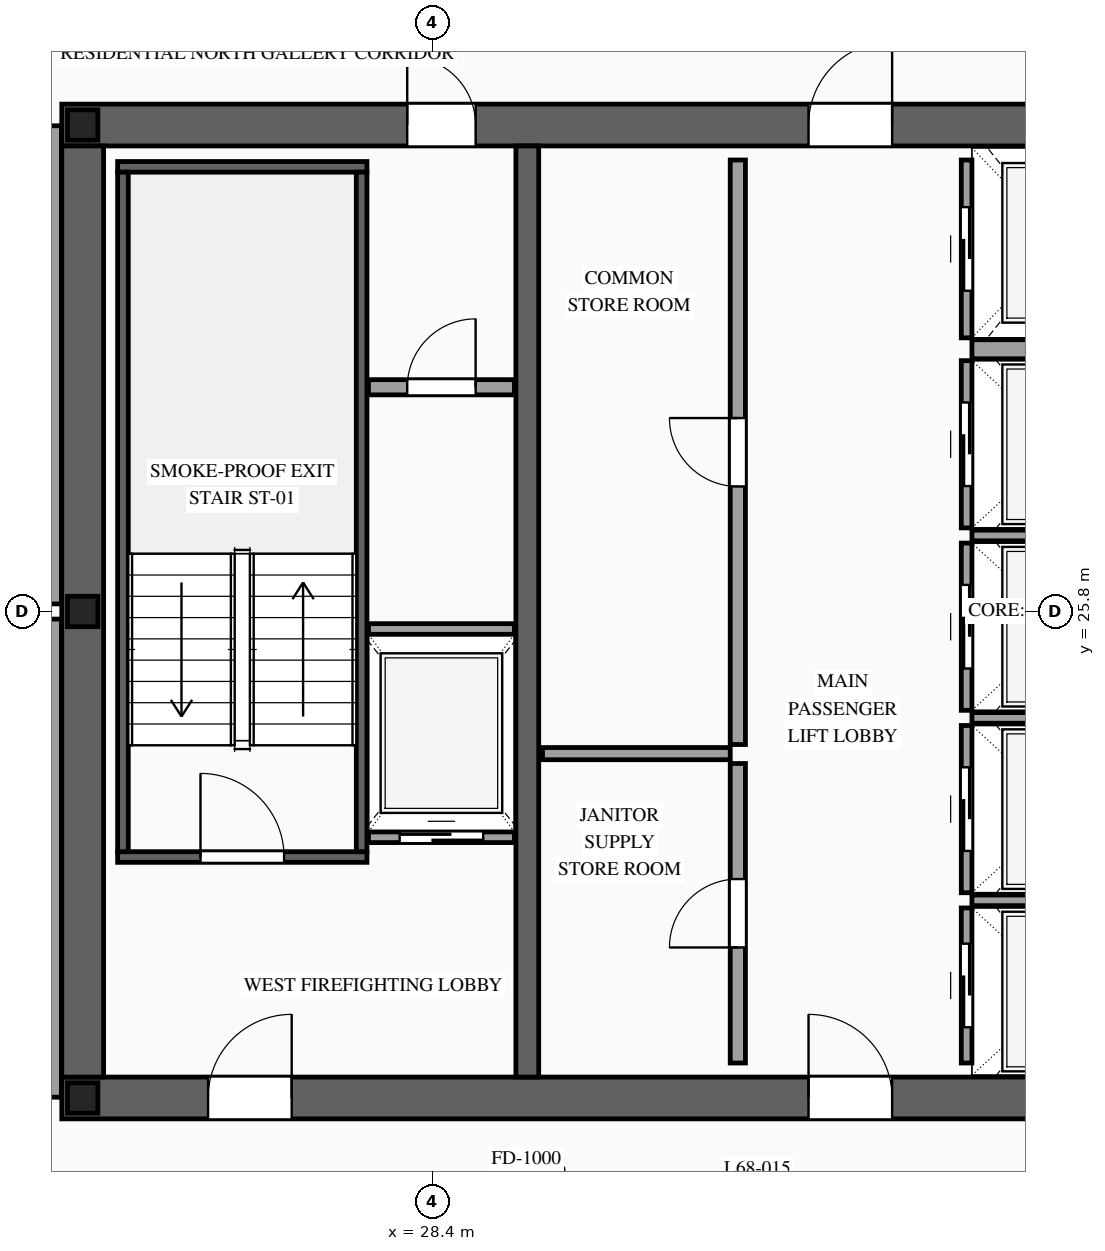
"""IFC4 building model, lengths in metres.
Left out: names, types, materials, properties, quantities, classifications, styles, units other than length and angle.
Written with IfcOpenShell. Run it as: python <this file> out.ifc"""

import sys

from ifc_helpers import new_model, si_unit, direction, frame, frame_2d, origin, origin_2d, place, context, subcontext, project, spatial, rectangle, i_section, extrude, source, transform, mapped, element, fill, save


model = new_model("IFC4")
c1 = context("Model", 3, precision=1e-05, world=origin(), true_north=direction((0.0, 1.0)))
c2 = subcontext(c1, "Body", "Model", "MODEL_VIEW")
j1 = project(units=[si_unit("LENGTHUNIT", "METRE"), si_unit("PLANEANGLEUNIT", "RADIAN")], contexts=[c1])
p1 = place(None, origin())
s1 = spatial("IfcSite", under=j1, at=p1, CompositionType="ELEMENT")
p2 = place(p1, origin())
s2 = spatial("IfcBuilding", under=s1, at=p2, CompositionType="ELEMENT")
p3 = place(p2, frame((0.0, 0.0, 255.6)))
s3 = spatial("IfcBuildingStorey", under=s2, at=p3, CompositionType="ELEMENT", Elevation=255.6)
p4 = place(p3, frame((23.525, 19.4, 0.0), z_axis=(0.0, 0.0, 1.0), x_axis=(1.0, 0.0, 0.0)))
e1 = element("IfcWall", 1, at=p4, inside=s3, PredefinedType="SHEAR", context=c2, shape_type="SweptSolid", body=[
    extrude(rectangle(XDim=26.95, YDim=0.55, at=frame_2d((13.475, 0.0))), origin(), (0.0, 0.0, 1.0), 3.5),
])
p5 = place(p4, frame((1.925, 0.0, 0.0)))
e2 = element("IfcOpeningElement", 2, at=p5, cuts=e1, PredefinedType="OPENING", context=c2, shape_type="SweptSolid", body=[
    extrude(rectangle(XDim=1.1, YDim=2.2, at=frame_2d((0.55, 1.1))), frame((0.0, 0.29, 0.0), z_axis=(0.0, -1.0, 0.0), x_axis=(1.0, 0.0, 0.0)), (0.0, 0.0, 1.0), 0.58),
])
p6 = place(p4, frame((9.825, 0.0, 0.0)))
e3 = element("IfcOpeningElement", 3, at=p6, cuts=e1, PredefinedType="OPENING", context=c2, shape_type="SweptSolid", body=[
    extrude(rectangle(XDim=1.1, YDim=2.2, at=frame_2d((0.55, 1.1))), frame((0.0, 0.29, 0.0), z_axis=(0.0, -1.0, 0.0), x_axis=(1.0, 0.0, 0.0)), (0.0, 0.0, 1.0), 0.58),
])
p7 = place(p4, frame((23.025, 0.0, 0.0)))
e4 = element("IfcOpeningElement", 4, at=p7, cuts=e1, PredefinedType="OPENING", context=c2, shape_type="SweptSolid", body=[
    extrude(rectangle(XDim=1.1, YDim=2.2, at=frame_2d((0.55, 1.1))), frame((0.0, 0.29, 0.0), z_axis=(0.0, -1.0, 0.0), x_axis=(1.0, 0.0, 0.0)), (0.0, 0.0, 1.0), 0.58),
])
p8 = place(p4, frame((19.645, 0.0, 0.0)))
e5 = element("IfcOpeningElement", 5, at=p8, cuts=e1, PredefinedType="OPENING", context=c2, shape_type="SweptSolid", body=[
    extrude(rectangle(XDim=0.9, YDim=2.15, at=frame_2d((0.45, 1.075))), frame((0.0, 0.29, 0.0), z_axis=(0.0, -1.0, 0.0), x_axis=(1.0, 0.0, 0.0)), (0.0, 0.0, 1.0), 0.58),
])
p9 = place(p4, frame((18.205, 0.0, 0.0)))
e6 = element("IfcOpeningElement", 6, at=p9, cuts=e1, PredefinedType="OPENING", context=c2, shape_type="SweptSolid", body=[
    extrude(rectangle(XDim=0.9, YDim=2.15, at=frame_2d((0.45, 1.075))), frame((0.0, 0.29, 0.0), z_axis=(0.0, -1.0, 0.0), x_axis=(1.0, 0.0, 0.0)), (0.0, 0.0, 1.0), 0.58),
])
p10 = place(p3, frame((23.525, 32.2, 0.0), z_axis=(0.0, 0.0, 1.0), x_axis=(1.0, 0.0, 0.0)))
e7 = element("IfcWall", 7, at=p10, inside=s3, PredefinedType="SHEAR", context=c2, shape_type="SweptSolid", body=[
    extrude(rectangle(XDim=26.95, YDim=0.55, at=frame_2d((13.475, 0.0))), origin(), (0.0, 0.0, 1.0), 3.5),
])
p11 = place(p10, frame((4.545, 0.0, 0.0)))
e8 = element("IfcOpeningElement", 8, at=p11, cuts=e7, PredefinedType="OPENING", context=c2, shape_type="SweptSolid", body=[
    extrude(rectangle(XDim=0.9, YDim=2.15, at=frame_2d((0.45, 1.075))), frame((0.0, 0.29, 0.0), z_axis=(0.0, -1.0, 0.0), x_axis=(1.0, 0.0, 0.0)), (0.0, 0.0, 1.0), 0.58),
])
p12 = place(p10, frame((9.825, 0.0, 0.0)))
e9 = element("IfcOpeningElement", 9, at=p12, cuts=e7, PredefinedType="OPENING", context=c2, shape_type="SweptSolid", body=[
    extrude(rectangle(XDim=1.1, YDim=2.2, at=frame_2d((0.55, 1.1))), frame((0.0, 0.29, 0.0), z_axis=(0.0, -1.0, 0.0), x_axis=(1.0, 0.0, 0.0)), (0.0, 0.0, 1.0), 0.58),
])
p13 = place(p10, frame((15.675, 0.0, 0.0)))
e10 = element("IfcOpeningElement", 10, at=p13, cuts=e7, PredefinedType="OPENING", context=c2, shape_type="SweptSolid", body=[
    extrude(rectangle(XDim=1.1, YDim=2.2, at=frame_2d((0.55, 1.1))), frame((0.0, 0.29, 0.0), z_axis=(0.0, -1.0, 0.0), x_axis=(1.0, 0.0, 0.0)), (0.0, 0.0, 1.0), 0.58),
])
p14 = place(p10, frame((18.875, 0.0, 0.0)))
e11 = element("IfcOpeningElement", 11, at=p14, cuts=e7, PredefinedType="OPENING", context=c2, shape_type="SweptSolid", body=[
    extrude(rectangle(XDim=0.9, YDim=2.15, at=frame_2d((0.45, 1.075))), frame((0.0, 0.29, 0.0), z_axis=(0.0, -1.0, 0.0), x_axis=(1.0, 0.0, 0.0)), (0.0, 0.0, 1.0), 0.58),
])
m1 = source(origin(), c2, "Body", "SweptSolid", [
    extrude(rectangle(XDim=12.25, YDim=0.55, at=frame_2d((6.125, 0.0))), origin(), (0.0, 0.0, 1.0), 3.5),
])
p15 = place(p3, frame((23.8, 19.675, 0.0), z_axis=(0.0, 0.0, 1.0), x_axis=(0.0, 1.0, 0.0)))
e12 = element("IfcWall", 12, at=p15, inside=s3, PredefinedType="SHEAR", context=c2, shape_type="MappedRepresentation", body=[
    mapped(m1, transform((0.0, 0.0, 0.0), scale=1.0)),
])
m2 = source(origin(), c2, "Body", "SweptSolid", [
    extrude(rectangle(XDim=12.25, YDim=0.3, at=frame_2d((6.125, 0.0))), origin(), (0.0, 0.0, 1.0), 3.5),
])
p16 = place(p3, frame((29.65, 19.675, 0.0), z_axis=(0.0, 0.0, 1.0), x_axis=(0.0, 1.0, 0.0)))
e13 = element("IfcWall", 13, at=p16, inside=s3, PredefinedType="SOLIDWALL", context=c2, shape_type="MappedRepresentation", body=[
    mapped(m2, transform((0.0, 0.0, 0.0), scale=1.0)),
])
m3 = source(origin(), c2, "Body", "SweptSolid", [
    extrude(i_section(OverallWidth=0.4, OverallDepth=0.4, WebThickness=0.013, FlangeThickness=0.021, at=origin_2d()), origin(), (0.0, 0.0, 1.0), 3.5),
])
for number, where, z_axis, x_axis in (
    (14, (23.8, 19.4, 0.0), (0.0, 0.0, 1.0), (1.0, 0.0, 0.0)),
    (15, (23.8, 25.8, 0.0), (0.0, 0.0, 1.0), (1.0, 0.0, 0.0)),
    (16, (23.8, 32.2, 0.0), (0.0, 0.0, 1.0), (1.0, 0.0, 0.0)),
):
    element("IfcColumn", number, at=place(p3, frame(where, z_axis=z_axis, x_axis=x_axis)), inside=s3, PredefinedType="COLUMN", context=c2, shape_type="MappedRepresentation", body=[
        mapped(m3, transform((0.0, 0.0, 0.0), scale=1.0)),
    ])
p17 = place(p3, frame((27.56, 22.83, 0.0), z_axis=(0.0, 0.0, 1.0), x_axis=(1.0, 0.0, 0.0)))
e17 = element("IfcWall", 17, at=p17, inside=s3, PredefinedType="SOLIDWALL", context=c2, shape_type="SweptSolid", body=[
    extrude(rectangle(XDim=1.92, YDim=0.14, at=frame_2d((0.96, 0.0))), origin(), (0.0, 0.0, 1.0), 3.2),
])
p18 = place(p17, frame((0.41, 0.0, 0.0)))
e18 = element("IfcOpeningElement", 18, at=p18, cuts=e17, PredefinedType="OPENING", context=c2, shape_type="SweptSolid", body=[
    extrude(rectangle(XDim=1.1, YDim=2.2, at=frame_2d((0.55, 1.1))), frame((0.0, 0.085, 0.0), z_axis=(0.0, -1.0, 0.0), x_axis=(1.0, 0.0, 0.0)), (0.0, 0.0, 1.0), 0.17),
])
m4 = source(origin(), c2, "Body", "SweptSolid", [
    extrude(rectangle(XDim=1.92, YDim=0.14, at=frame_2d((0.96, 0.0))), origin(), (0.0, 0.0, 1.0), 3.2),
])
p19 = place(p3, frame((27.56, 25.57, 0.0), z_axis=(0.0, 0.0, 1.0), x_axis=(1.0, 0.0, 0.0)))
e19 = element("IfcWall", 19, at=p19, inside=s3, PredefinedType="SOLIDWALL", context=c2, shape_type="MappedRepresentation", body=[
    mapped(m4, transform((0.0, 0.0, 0.0), scale=1.0)),
])
p20 = place(p3, frame((35.43, 19.86, 0.0), z_axis=(0.0, 0.0, 1.0), x_axis=(0.0, 1.0, 0.0)))
e20 = element("IfcWall", 20, at=p20, inside=s3, PredefinedType="SOLIDWALL", context=c2, shape_type="SweptSolid", body=[
    extrude(rectangle(XDim=2.04, YDim=0.14, at=frame_2d((1.02, 0.0))), origin(), (0.0, 0.0, 1.0), 3.2),
])
p21 = place(p20, frame((0.47, 0.0, 0.0)))
e21 = element("IfcOpeningElement", 21, at=p21, cuts=e20, PredefinedType="OPENING", context=c2, shape_type="SweptSolid", body=[
    extrude(rectangle(XDim=1.1, YDim=2.2, at=frame_2d((0.55, 1.1))), frame((0.0, 0.085, 0.0), z_axis=(0.0, -1.0, 0.0), x_axis=(1.0, 0.0, 0.0)), (0.0, 0.0, 1.0), 0.17),
])
m5 = source(origin(), c2, "Body", "SweptSolid", [
    extrude(rectangle(XDim=2.4, YDim=0.14, at=frame_2d((1.2, 0.0))), origin(), (0.0, 0.0, 1.0), 3.2),
])
p22 = place(p3, frame((35.5, 22.0, 0.0), z_axis=(0.0, 0.0, 1.0), x_axis=(1.0, 0.0, 0.0)))
e22 = element("IfcWall", 22, at=p22, inside=s3, PredefinedType="SOLIDWALL", context=c2, shape_type="MappedRepresentation", body=[
    mapped(m5, transform((0.0, 0.0, 0.0), scale=1.0)),
])
p23 = place(p3, frame((35.43, 22.1, 0.0), z_axis=(0.0, 0.0, 1.0), x_axis=(0.0, 1.0, 0.0)))
e23 = element("IfcWall", 23, at=p23, inside=s3, PredefinedType="SOLIDWALL", context=c2, shape_type="SweptSolid", body=[
    extrude(rectangle(XDim=2.2, YDim=0.14, at=frame_2d((1.1, 0.0))), origin(), (0.0, 0.0, 1.0), 3.2),
])
p24 = place(p23, frame((0.55, 0.0, 0.0)))
e24 = element("IfcOpeningElement", 24, at=p24, cuts=e23, PredefinedType="OPENING", context=c2, shape_type="SweptSolid", body=[
    extrude(rectangle(XDim=1.1, YDim=2.2, at=frame_2d((0.55, 1.1))), frame((0.0, 0.085, 0.0), z_axis=(0.0, -1.0, 0.0), x_axis=(1.0, 0.0, 0.0)), (0.0, 0.0, 1.0), 0.17),
])
p25 = place(p3, frame((35.5, 24.4, 0.0), z_axis=(0.0, 0.0, 1.0), x_axis=(1.0, 0.0, 0.0)))
e25 = element("IfcWall", 25, at=p25, inside=s3, PredefinedType="SOLIDWALL", context=c2, shape_type="MappedRepresentation", body=[
    mapped(m5, transform((0.0, 0.0, 0.0), scale=1.0)),
])
p26 = place(p3, frame((35.43, 24.5, 0.0), z_axis=(0.0, 0.0, 1.0), x_axis=(0.0, 1.0, 0.0)))
e26 = element("IfcWall", 26, at=p26, inside=s3, PredefinedType="SOLIDWALL", context=c2, shape_type="SweptSolid", body=[
    extrude(rectangle(XDim=2.2, YDim=0.14, at=frame_2d((1.1, 0.0))), origin(), (0.0, 0.0, 1.0), 3.2),
])
p27 = place(p26, frame((0.55, 0.0, 0.0)))
e27 = element("IfcOpeningElement", 27, at=p27, cuts=e26, PredefinedType="OPENING", context=c2, shape_type="SweptSolid", body=[
    extrude(rectangle(XDim=1.1, YDim=2.2, at=frame_2d((0.55, 1.1))), frame((0.0, 0.085, 0.0), z_axis=(0.0, -1.0, 0.0), x_axis=(1.0, 0.0, 0.0)), (0.0, 0.0, 1.0), 0.17),
])
p28 = place(p3, frame((35.5, 26.8, 0.0), z_axis=(0.0, 0.0, 1.0), x_axis=(1.0, 0.0, 0.0)))
e28 = element("IfcWall", 28, at=p28, inside=s3, PredefinedType="SOLIDWALL", context=c2, shape_type="MappedRepresentation", body=[
    mapped(m5, transform((0.0, 0.0, 0.0), scale=1.0)),
])
p29 = place(p3, frame((35.43, 26.9, 0.0), z_axis=(0.0, 0.0, 1.0), x_axis=(0.0, 1.0, 0.0)))
e29 = element("IfcWall", 29, at=p29, inside=s3, PredefinedType="SOLIDWALL", context=c2, shape_type="SweptSolid", body=[
    extrude(rectangle(XDim=2.2, YDim=0.14, at=frame_2d((1.1, 0.0))), origin(), (0.0, 0.0, 1.0), 3.2),
])
p30 = place(p29, frame((0.55, 0.0, 0.0)))
e30 = element("IfcOpeningElement", 30, at=p30, cuts=e29, PredefinedType="OPENING", context=c2, shape_type="SweptSolid", body=[
    extrude(rectangle(XDim=1.1, YDim=2.2, at=frame_2d((0.55, 1.1))), frame((0.0, 0.085, 0.0), z_axis=(0.0, -1.0, 0.0), x_axis=(1.0, 0.0, 0.0)), (0.0, 0.0, 1.0), 0.17),
])
p31 = place(p3, frame((35.43, 29.4, 0.0), z_axis=(0.0, 0.0, 1.0), x_axis=(0.0, 1.0, 0.0)))
e31 = element("IfcWall", 31, at=p31, inside=s3, PredefinedType="SOLIDWALL", context=c2, shape_type="SweptSolid", body=[
    extrude(rectangle(XDim=2.34, YDim=0.14, at=frame_2d((1.17, 0.0))), origin(), (0.0, 0.0, 1.0), 3.2),
])
p32 = place(p31, frame((0.62, 0.0, 0.0)))
e32 = element("IfcOpeningElement", 32, at=p32, cuts=e31, PredefinedType="OPENING", context=c2, shape_type="SweptSolid", body=[
    extrude(rectangle(XDim=1.1, YDim=2.2, at=frame_2d((0.55, 1.1))), frame((0.0, 0.085, 0.0), z_axis=(0.0, -1.0, 0.0), x_axis=(1.0, 0.0, 0.0)), (0.0, 0.0, 1.0), 0.17),
])
m6 = source(origin(), c2, "Body", "SweptSolid", [
    extrude(rectangle(XDim=2.4, YDim=0.25, at=frame_2d((1.2, 0.0))), origin(), (0.0, 0.0, 1.0), 3.2),
])
p33 = place(p3, frame((35.5, 29.25, 0.0), z_axis=(0.0, 0.0, 1.0), x_axis=(1.0, 0.0, 0.0)))
e33 = element("IfcWall", 33, at=p33, inside=s3, PredefinedType="SOLIDWALL", context=c2, shape_type="MappedRepresentation", body=[
    mapped(m6, transform((0.0, 0.0, 0.0), scale=1.0)),
])
p34 = place(p3, frame((24.26, 22.57, 0.0), z_axis=(0.0, 0.0, 1.0), x_axis=(1.0, 0.0, 0.0)))
e34 = element("IfcWall", 34, at=p34, inside=s3, PredefinedType="SOLIDWALL", context=c2, shape_type="SweptSolid", body=[
    extrude(rectangle(XDim=3.28, YDim=0.14, at=frame_2d((1.64, 0.0))), origin(), (0.0, 0.0, 1.0), 3.2),
])
p35 = place(p34, frame((1.09, 0.0, 0.0)))
e35 = element("IfcOpeningElement", 35, at=p35, cuts=e34, PredefinedType="OPENING", context=c2, shape_type="SweptSolid", body=[
    extrude(rectangle(XDim=1.1, YDim=2.2, at=frame_2d((0.55, 1.1))), frame((0.0, 0.085, 0.0), z_axis=(0.0, -1.0, 0.0), x_axis=(1.0, 0.0, 0.0)), (0.0, 0.0, 1.0), 0.17),
])
m7 = source(origin(), c2, "Body", "SweptSolid", [
    extrude(rectangle(XDim=3.28, YDim=0.14, at=frame_2d((1.64, 0.0))), origin(), (0.0, 0.0, 1.0), 3.2),
])
p36 = place(p3, frame((24.26, 31.65, 0.0), z_axis=(0.0, 0.0, 1.0), x_axis=(1.0, 0.0, 0.0)))
e36 = element("IfcWall", 36, at=p36, inside=s3, PredefinedType="SOLIDWALL", context=c2, shape_type="MappedRepresentation", body=[
    mapped(m7, transform((0.0, 0.0, 0.0), scale=1.0)),
])
m8 = source(origin(), c2, "Body", "SweptSolid", [
    extrude(rectangle(XDim=8.94, YDim=0.14, at=frame_2d((4.47, 0.0))), origin(), (0.0, 0.0, 1.0), 3.2),
])
for number, where, z_axis, x_axis in (
    (37, (24.33, 22.64, 0.0), (0.0, 0.0, 1.0), (0.0, 1.0, 0.0)),
    (38, (27.47, 22.64, 0.0), (0.0, 0.0, 1.0), (0.0, 1.0, 0.0)),
):
    element("IfcWall", number, at=place(p3, frame(where, z_axis=z_axis, x_axis=x_axis)), inside=s3, PredefinedType="SOLIDWALL", context=c2, shape_type="MappedRepresentation", body=[
        mapped(m8, transform((0.0, 0.0, 0.0), scale=1.0)),
    ])
p37 = place(p3, frame((27.56, 28.75, 0.0), z_axis=(0.0, 0.0, 1.0), x_axis=(1.0, 0.0, 0.0)))
e39 = element("IfcWall", 39, at=p37, inside=s3, PredefinedType="PARTITIONING", context=c2, shape_type="SweptSolid", body=[
    extrude(rectangle(XDim=1.92, YDim=0.2, at=frame_2d((0.96, 0.0))), origin(), (0.0, 0.0, 1.0), 3.2),
])
p38 = place(p37, frame((0.51, 0.0, 0.0)))
e40 = element("IfcOpeningElement", 40, at=p38, cuts=e39, PredefinedType="OPENING", context=c2, shape_type="SweptSolid", body=[
    extrude(rectangle(XDim=0.9, YDim=2.15, at=frame_2d((0.45, 1.075))), frame((0.0, 0.115, 0.0), z_axis=(0.0, -1.0, 0.0), x_axis=(1.0, 0.0, 0.0)), (0.0, 0.0, 1.0), 0.23),
])
p39 = place(p3, frame((32.42, 19.86, 0.0), z_axis=(0.0, 0.0, 1.0), x_axis=(0.0, 1.0, 0.0)))
e41 = element("IfcWall", 41, at=p39, inside=s3, PredefinedType="PARTITIONING", context=c2, shape_type="SweptSolid", body=[
    extrude(rectangle(XDim=3.94, YDim=0.2, at=frame_2d((1.97, 0.0))), origin(), (0.0, 0.0, 1.0), 3.2),
])
p40 = place(p39, frame((1.52, 0.0, 0.0)))
e42 = element("IfcOpeningElement", 42, at=p40, cuts=e41, PredefinedType="OPENING", context=c2, shape_type="SweptSolid", body=[
    extrude(rectangle(XDim=0.9, YDim=2.15, at=frame_2d((0.45, 1.075))), frame((0.0, 0.115, 0.0), z_axis=(0.0, -1.0, 0.0), x_axis=(1.0, 0.0, 0.0)), (0.0, 0.0, 1.0), 0.23),
])
p41 = place(p3, frame((32.42, 24.05, 0.0), z_axis=(0.0, 0.0, 1.0), x_axis=(0.0, 1.0, 0.0)))
e43 = element("IfcWall", 43, at=p41, inside=s3, PredefinedType="PARTITIONING", context=c2, shape_type="SweptSolid", body=[
    extrude(rectangle(XDim=7.69, YDim=0.2, at=frame_2d((3.845, 0.0))), origin(), (0.0, 0.0, 1.0), 3.2),
])
p42 = place(p41, frame((3.395, 0.0, 0.0)))
e44 = element("IfcOpeningElement", 44, at=p42, cuts=e43, PredefinedType="OPENING", context=c2, shape_type="SweptSolid", body=[
    extrude(rectangle(XDim=0.9, YDim=2.15, at=frame_2d((0.45, 1.075))), frame((0.0, 0.115, 0.0), z_axis=(0.0, -1.0, 0.0), x_axis=(1.0, 0.0, 0.0)), (0.0, 0.0, 1.0), 0.23),
])
m9 = source(origin(), c2, "Body", "SweptSolid", [
    extrude(rectangle(XDim=2.47, YDim=0.16, at=frame_2d((1.235, 0.0))), origin(), (0.0, 0.0, 1.0), 3.2),
])
p43 = place(p3, frame((29.85, 23.93, 0.0), z_axis=(0.0, 0.0, 1.0), x_axis=(1.0, 0.0, 0.0)))
e45 = element("IfcWall", 45, at=p43, inside=s3, PredefinedType="PARTITIONING", context=c2, shape_type="MappedRepresentation", body=[
    mapped(m9, transform((0.0, 0.0, 0.0), scale=1.0)),
])
m10 = source(origin(), c2, "Body", "SweptSolid", [
    extrude(rectangle(XDim=6.29, YDim=0.2, at=frame_2d((3.145, 0.0))), origin(), (0.0, 0.0, 1.0), 3.2),
])
for number, where, z_axis, x_axis in (
    (46, (23.42, 19.41, 0.0), (0.0, 0.0, 1.0), (0.0, 1.0, 0.0)),
    (47, (23.42, 25.9, 0.0), (0.0, 0.0, 1.0), (0.0, 1.0, 0.0)),
):
    element("IfcWall", number, at=place(p3, frame(where, z_axis=z_axis, x_axis=x_axis)), inside=s3, PredefinedType="PARTITIONING", context=c2, shape_type="MappedRepresentation", body=[
        mapped(m10, transform((0.0, 0.0, 0.0), scale=1.0)),
    ])
m11 = source(origin(), c2, "Body", "SweptSolid", [
    extrude(rectangle(XDim=1.1, YDim=2.2, at=frame_2d((0.55, 1.1))), frame((0.0, 0.025, 0.0), z_axis=(0.0, -1.0, 0.0), x_axis=(1.0, 0.0, 0.0)), (0.0, 0.0, 1.0), 0.05),
])
p44 = place(p18, origin())
e48 = element("IfcDoor", 48, at=p44, inside=s3, OperationType="SLIDING_TO_LEFT", PredefinedType="DOOR", context=c2, shape_type="MappedRepresentation", body=[
    mapped(m11, transform((0.0, 0.0, 0.0), scale=1.0)),
])
fill(e18, e48)
p45 = place(p21, origin())
e49 = element("IfcDoor", 49, at=p45, inside=s3, OperationType="SLIDING_TO_RIGHT", PredefinedType="DOOR", context=c2, shape_type="MappedRepresentation", body=[
    mapped(m11, transform((0.0, 0.0, 0.0), scale=1.0)),
])
fill(e21, e49)
p46 = place(p24, origin())
e50 = element("IfcDoor", 50, at=p46, inside=s3, OperationType="SLIDING_TO_LEFT", PredefinedType="DOOR", context=c2, shape_type="MappedRepresentation", body=[
    mapped(m11, transform((0.0, 0.0, 0.0), scale=1.0)),
])
fill(e24, e50)
p47 = place(p27, origin())
e51 = element("IfcDoor", 51, at=p47, inside=s3, OperationType="SLIDING_TO_RIGHT", PredefinedType="DOOR", context=c2, shape_type="MappedRepresentation", body=[
    mapped(m11, transform((0.0, 0.0, 0.0), scale=1.0)),
])
fill(e27, e51)
p48 = place(p30, origin())
e52 = element("IfcDoor", 52, at=p48, inside=s3, OperationType="SLIDING_TO_LEFT", PredefinedType="DOOR", context=c2, shape_type="MappedRepresentation", body=[
    mapped(m11, transform((0.0, 0.0, 0.0), scale=1.0)),
])
fill(e30, e52)
p49 = place(p32, origin())
e53 = element("IfcDoor", 53, at=p49, inside=s3, OperationType="SLIDING_TO_RIGHT", PredefinedType="DOOR", context=c2, shape_type="MappedRepresentation", body=[
    mapped(m11, transform((0.0, 0.0, 0.0), scale=1.0)),
])
fill(e32, e53)
m12 = source(origin(), c2, "Body", "SweptSolid", [
    extrude(rectangle(XDim=1.1, YDim=2.2, at=frame_2d((0.55, 1.1))), frame((0.0, 0.025, 0.0), z_axis=(0.0, -1.0, 0.0), x_axis=(1.0, 0.0, 0.0)), (0.0, 0.0, 1.0), 0.05),
])
p50 = place(p35, origin())
e54 = element("IfcDoor", 54, at=p50, inside=s3, OperationType="SINGLE_SWING_LEFT", PredefinedType="DOOR", context=c2, shape_type="MappedRepresentation", body=[
    mapped(m12, transform((0.0, 0.0, 0.0), scale=1.0)),
])
fill(e35, e54)
p51 = place(p5, origin())
e55 = element("IfcDoor", 55, at=p51, inside=s3, OperationType="SINGLE_SWING_RIGHT", PredefinedType="DOOR", context=c2, shape_type="MappedRepresentation", body=[
    mapped(m12, transform((0.0, 0.0, 0.0), scale=1.0)),
])
fill(e2, e55)
p52 = place(p6, origin())
e56 = element("IfcDoor", 56, at=p52, inside=s3, OperationType="SINGLE_SWING_LEFT", PredefinedType="DOOR", context=c2, shape_type="MappedRepresentation", body=[
    mapped(m12, transform((0.0, 0.0, 0.0), scale=1.0)),
])
fill(e3, e56)
m13 = source(origin(), c2, "Body", "SweptSolid", [
    extrude(rectangle(XDim=0.9, YDim=2.15, at=frame_2d((0.45, 1.075))), frame((0.0, 0.025, 0.0), z_axis=(0.0, -1.0, 0.0), x_axis=(1.0, 0.0, 0.0)), (0.0, 0.0, 1.0), 0.05),
])
p53 = place(p11, origin())
e57 = element("IfcDoor", 57, at=p53, inside=s3, OperationType="SINGLE_SWING_LEFT", PredefinedType="DOOR", context=c2, shape_type="MappedRepresentation", body=[
    mapped(m13, transform((0.0, 0.0, 0.0), scale=1.0)),
])
fill(e8, e57)
p54 = place(p12, origin())
e58 = element("IfcDoor", 58, at=p54, inside=s3, OperationType="SINGLE_SWING_RIGHT", PredefinedType="DOOR", context=c2, shape_type="MappedRepresentation", body=[
    mapped(m12, transform((0.0, 0.0, 0.0), scale=1.0)),
])
fill(e9, e58)
p55 = place(p38, origin())
e59 = element("IfcDoor", 59, at=p55, inside=s3, OperationType="SINGLE_SWING_RIGHT", PredefinedType="DOOR", context=c2, shape_type="MappedRepresentation", body=[
    mapped(m13, transform((0.0, 0.0, 0.0), scale=1.0)),
])
fill(e40, e59)
p56 = place(p40, origin())
e60 = element("IfcDoor", 60, at=p56, inside=s3, OperationType="SINGLE_SWING_LEFT", PredefinedType="DOOR", context=c2, shape_type="MappedRepresentation", body=[
    mapped(m13, transform((0.0, 0.0, 0.0), scale=1.0)),
])
fill(e42, e60)
p57 = place(p42, origin())
e61 = element("IfcDoor", 61, at=p57, inside=s3, OperationType="SINGLE_SWING_RIGHT", PredefinedType="DOOR", context=c2, shape_type="MappedRepresentation", body=[
    mapped(m13, transform((0.0, 0.0, 0.0), scale=1.0)),
])
fill(e44, e61)
save(model, sys.argv[1])
